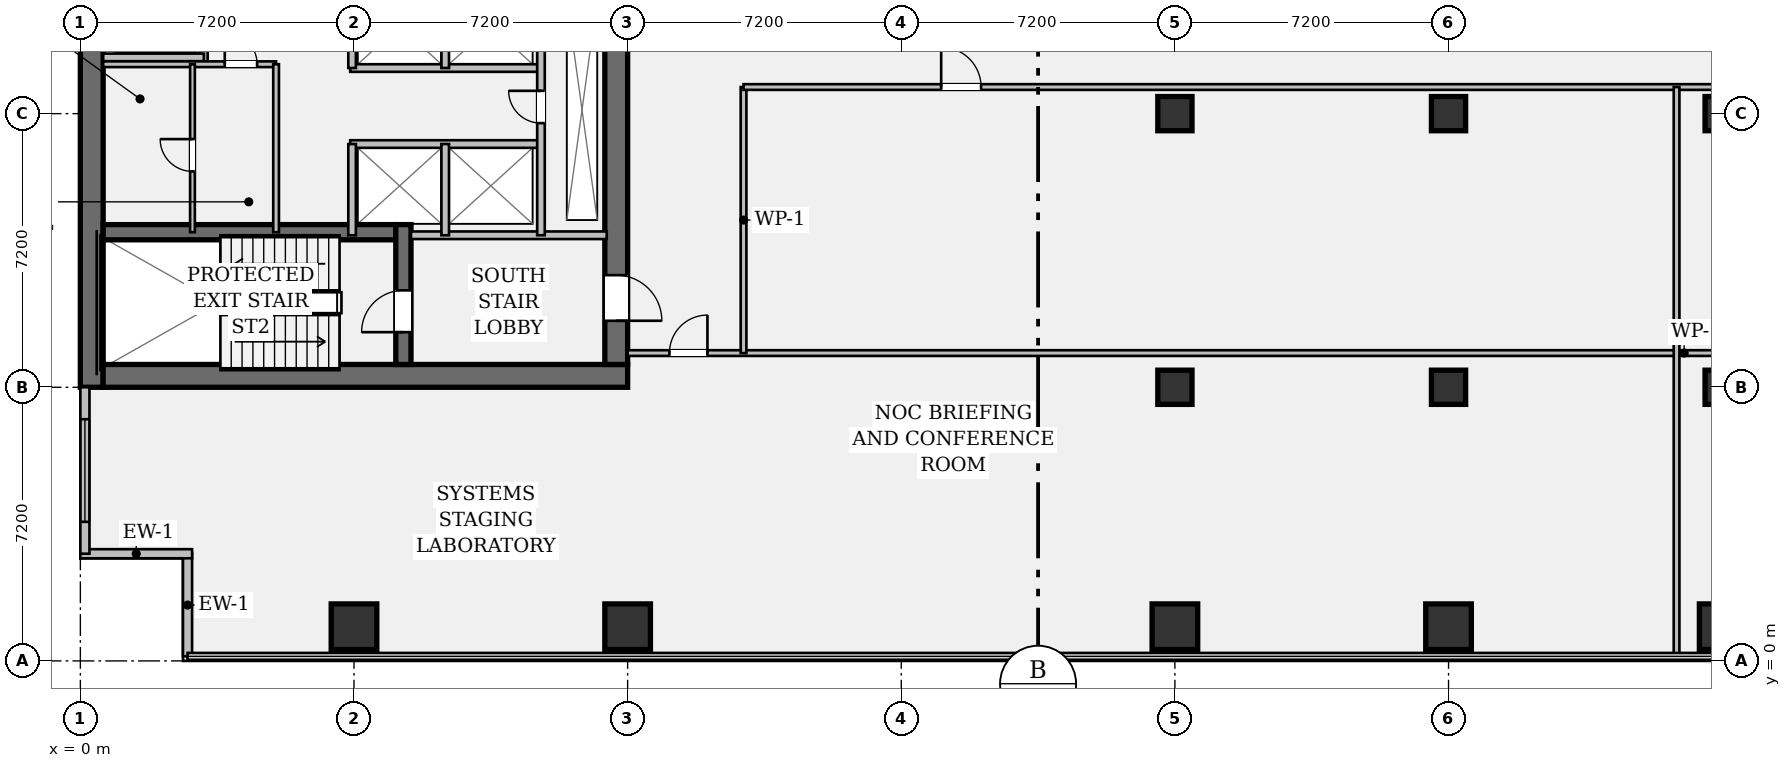
"""IFC4 building model, lengths in metres.
Left out: names, types, materials, properties, quantities, classifications, styles, units other than length and angle.
Written with IfcOpenShell. Run it as: python <this file> out.ifc"""

import sys

from ifc_helpers import new_model, si_unit, direction, frame, frame_2d, origin, origin_2d, place, context, subcontext, project, spatial, rectangle, hollow_rectangle, extrude, element, fill, save


model = new_model("IFC4")
c1 = context("Model", 3, precision=1e-05, world=origin(), true_north=direction((0.0, 1.0)))
c2 = subcontext(c1, "Body", "Model", "MODEL_VIEW")
j1 = project(units=[si_unit("LENGTHUNIT", "METRE"), si_unit("PLANEANGLEUNIT", "RADIAN")], contexts=[c1])
p1 = place(None, origin())
s1 = spatial("IfcSite", under=j1, at=p1, CompositionType="ELEMENT")
p2 = place(p1, origin())
s2 = spatial("IfcBuilding", under=s1, at=p2, CompositionType="ELEMENT")
p3 = place(p2, frame((0.0, 0.0, 5.25)))
s3 = spatial("IfcBuildingStorey", under=s2, at=p3, CompositionType="ELEMENT", Elevation=5.25)
p4 = place(p3, frame((0.3, 7.2, 0.0), z_axis=(0.0, 0.0, 1.0), x_axis=(0.0, 1.0, 0.0)))
e1 = element("IfcWall", 1, at=p4, inside=s3, PredefinedType="SHEAR", context=c2, shape_type="SweptSolid", body=[
    extrude(rectangle(XDim=28.8, YDim=0.6, at=frame_2d((14.4, 0.0))), origin(), (0.0, 0.0, 1.0), 3.9),
])
p5 = place(p3, frame((0.6, 7.5, 0.0), z_axis=(0.0, 0.0, 1.0), x_axis=(1.0, 0.0, 0.0)))
e2 = element("IfcWall", 2, at=p5, inside=s3, PredefinedType="SHEAR", context=c2, shape_type="SweptSolid", body=[
    extrude(rectangle(XDim=13.8, YDim=0.6, at=frame_2d((6.9, 0.0))), origin(), (0.0, 0.0, 1.0), 3.9),
])
p6 = place(p3, frame((14.1, 35.4, 0.0), z_axis=(0.0, 0.0, 1.0), x_axis=(0.0, -1.0, 0.0)))
e3 = element("IfcWall", 3, at=p6, inside=s3, PredefinedType="SHEAR", context=c2, shape_type="SweptSolid", body=[
    extrude(rectangle(XDim=27.6, YDim=0.6, at=frame_2d((13.8, 0.0))), origin(), (0.0, 0.0, 1.0), 3.9),
])
p7 = place(p6, frame((1.3, 0.0, 0.0)))
e4 = element("IfcOpeningElement", 4, at=p7, cuts=e3, PredefinedType="OPENING", context=c2, shape_type="SweptSolid", body=[
    extrude(rectangle(XDim=1.2, YDim=2.15, at=frame_2d((0.6, 1.075))), frame((0.0, 0.312, 0.0), z_axis=(0.0, -1.0, 0.0), x_axis=(1.0, 0.0, 0.0)), (0.0, 0.0, 1.0), 0.624),
])
p8 = place(p6, frame((25.25, 0.0, 0.0)))
e5 = element("IfcOpeningElement", 5, at=p8, cuts=e3, PredefinedType="OPENING", context=c2, shape_type="SweptSolid", body=[
    extrude(rectangle(XDim=1.2, YDim=2.15, at=frame_2d((0.6, 1.075))), frame((0.0, 0.312, 0.0), z_axis=(0.0, -1.0, 0.0), x_axis=(1.0, 0.0, 0.0)), (0.0, 0.0, 1.0), 0.624),
])
p9 = place(p6, frame((14.6, 0.0, 0.0)))
e6 = element("IfcOpeningElement", 6, at=p9, cuts=e3, PredefinedType="OPENING", context=c2, shape_type="SweptSolid", body=[
    extrude(rectangle(XDim=1.6, YDim=2.2, at=frame_2d((0.8, 1.1))), frame((0.0, 0.312, 0.0), z_axis=(0.0, -1.0, 0.0), x_axis=(1.0, 0.0, 0.0)), (0.0, 0.0, 1.0), 0.624),
])
p10 = place(p3, frame((0.6, 11.28, 0.0), z_axis=(0.0, 0.0, 1.0), x_axis=(1.0, 0.0, 0.0)))
e7 = element("IfcWall", 7, at=p10, inside=s3, PredefinedType="SHEAR", context=c2, shape_type="SweptSolid", body=[
    extrude(rectangle(XDim=7.7, YDim=0.4, at=frame_2d((3.85, 0.0))), origin(), (0.0, 0.0, 1.0), 3.9),
])
p11 = place(p3, frame((8.5, 7.8, 0.0), z_axis=(0.0, 0.0, 1.0), x_axis=(0.0, 1.0, 0.0)))
e8 = element("IfcWall", 8, at=p11, inside=s3, PredefinedType="SHEAR", context=c2, shape_type="SweptSolid", body=[
    extrude(rectangle(XDim=3.68, YDim=0.4, at=frame_2d((1.84, 0.0))), origin(), (0.0, 0.0, 1.0), 3.9),
])
p12 = place(p11, frame((0.85, 0.0, 0.0)))
e9 = element("IfcOpeningElement", 9, at=p12, cuts=e8, PredefinedType="OPENING", context=c2, shape_type="SweptSolid", body=[
    extrude(rectangle(XDim=1.1, YDim=2.15, at=frame_2d((0.55, 1.075))), frame((0.0, 0.212, 0.0), z_axis=(0.0, -1.0, 0.0), x_axis=(1.0, 0.0, 0.0)), (0.0, 0.0, 1.0), 0.424),
])
for number, where, z_axis, x_axis in (
    (10, (7.2, 0.9, 0.0), (0.0, 0.0, 1.0), (1.0, 0.0, 0.0)),
    (11, (14.4, 0.9, 0.0), (0.0, 0.0, 1.0), (1.0, 0.0, 0.0)),
    (12, (28.8, 0.9, 0.0), (0.0, 0.0, 1.0), (1.0, 0.0, 0.0)),
):
    element("IfcColumn", number, at=place(p3, frame(where, z_axis=z_axis, x_axis=x_axis)), inside=s3, PredefinedType="COLUMN", context=c2, shape_type="SweptSolid", body=[
        extrude(hollow_rectangle(XDim=1.2, YDim=1.2, WallThickness=0.075, at=origin_2d()), origin(), (0.0, 0.0, 1.0), 3.9),
    ])
for number, where, z_axis, x_axis in (
    (13, (28.8, 7.2, 0.0), (0.0, 0.0, 1.0), (1.0, 0.0, 0.0)),
    (14, (28.8, 14.4, 0.0), (0.0, 0.0, 1.0), (1.0, 0.0, 0.0)),
):
    element("IfcColumn", number, at=place(p3, frame(where, z_axis=z_axis, x_axis=x_axis)), inside=s3, PredefinedType="COLUMN", context=c2, shape_type="SweptSolid", body=[
        extrude(rectangle(XDim=0.9, YDim=0.9, at=origin_2d()), origin(), (0.0, 0.0, 1.0), 3.9),
    ])
p13 = place(p3, frame((36.0, 0.9, 0.0), z_axis=(0.0, 0.0, 1.0), x_axis=(1.0, 0.0, 0.0)))
e15 = element("IfcColumn", 15, at=p13, inside=s3, PredefinedType="COLUMN", context=c2, shape_type="SweptSolid", body=[
    extrude(hollow_rectangle(XDim=1.2, YDim=1.2, WallThickness=0.075, at=origin_2d()), origin(), (0.0, 0.0, 1.0), 3.9),
])
for number, where, z_axis, x_axis in (
    (16, (36.0, 7.2, 0.0), (0.0, 0.0, 1.0), (1.0, 0.0, 0.0)),
    (17, (36.0, 14.4, 0.0), (0.0, 0.0, 1.0), (1.0, 0.0, 0.0)),
):
    element("IfcColumn", number, at=place(p3, frame(where, z_axis=z_axis, x_axis=x_axis)), inside=s3, PredefinedType="COLUMN", context=c2, shape_type="SweptSolid", body=[
        extrude(rectangle(XDim=0.9, YDim=0.9, at=origin_2d()), origin(), (0.0, 0.0, 1.0), 3.9),
    ])
p14 = place(p3, frame((43.2, 0.9, 0.0), z_axis=(0.0, 0.0, 1.0), x_axis=(1.0, 0.0, 0.0)))
e18 = element("IfcColumn", 18, at=p14, inside=s3, PredefinedType="COLUMN", context=c2, shape_type="SweptSolid", body=[
    extrude(hollow_rectangle(XDim=1.2, YDim=1.2, WallThickness=0.075, at=origin_2d()), origin(), (0.0, 0.0, 1.0), 3.9),
])
for number, where, z_axis, x_axis in (
    (19, (43.2, 7.2, 0.0), (0.0, 0.0, 1.0), (1.0, 0.0, 0.0)),
    (20, (43.2, 14.4, 0.0), (0.0, 0.0, 1.0), (1.0, 0.0, 0.0)),
):
    element("IfcColumn", number, at=place(p3, frame(where, z_axis=z_axis, x_axis=x_axis)), inside=s3, PredefinedType="COLUMN", context=c2, shape_type="SweptSolid", body=[
        extrude(rectangle(XDim=0.9, YDim=0.9, at=origin_2d()), origin(), (0.0, 0.0, 1.0), 3.9),
    ])
p15 = place(p3, frame((2.82, 0.12, 0.0), z_axis=(0.0, 0.0, 1.0), x_axis=(0.0, 1.0, 0.0)))
e21 = element("IfcWall", 21, at=p15, inside=s3, PredefinedType="STANDARD", context=c2, shape_type="SweptSolid", body=[
    extrude(rectangle(XDim=2.7, YDim=0.24, at=frame_2d((1.35, 0.0))), origin(), (0.0, 0.0, 1.0), 3.9),
])
p16 = place(p3, frame((2.94, 2.82, 0.0), z_axis=(0.0, 0.0, 1.0), x_axis=(-1.0, 0.0, 0.0)))
e22 = element("IfcWall", 22, at=p16, inside=s3, PredefinedType="STANDARD", context=c2, shape_type="SweptSolid", body=[
    extrude(rectangle(XDim=2.94, YDim=0.24, at=frame_2d((1.47, 0.0))), origin(), (0.0, 0.0, 1.0), 3.9),
])
p17 = place(p3, frame((0.12, 2.82, 0.0), z_axis=(0.0, 0.0, 1.0), x_axis=(0.0, 1.0, 0.0)))
e23 = element("IfcWall", 23, at=p17, inside=s3, PredefinedType="STANDARD", context=c2, shape_type="SweptSolid", body=[
    extrude(rectangle(XDim=4.38, YDim=0.24, at=frame_2d((2.19, 0.0))), origin(), (0.0, 0.0, 1.0), 3.9),
])
p18 = place(p17, frame((0.84, 0.0, 0.95)))
e24 = element("IfcOpeningElement", 24, at=p18, cuts=e23, PredefinedType="OPENING", context=c2, shape_type="SweptSolid", body=[
    extrude(rectangle(XDim=2.7, YDim=1.65, at=frame_2d((1.35, 0.825))), frame((0.0, 0.132, 0.0), z_axis=(0.0, -1.0, 0.0), x_axis=(1.0, 0.0, 0.0)), (0.0, 0.0, 1.0), 0.264),
])
p19 = place(p3, frame((8.7, 11.2, 0.0), z_axis=(0.0, 0.0, 1.0), x_axis=(1.0, 0.0, 0.0)))
e25 = element("IfcWall", 25, at=p19, inside=s3, PredefinedType="PARTITIONING", context=c2, shape_type="SweptSolid", body=[
    extrude(rectangle(XDim=5.15, YDim=0.2, at=frame_2d((2.575, 0.0))), origin(), (0.0, 0.0, 1.0), 3.9),
])
p20 = place(p3, frame((3.25, 15.7, 0.0), z_axis=(0.0, 0.0, 1.0), x_axis=(0.0, 1.0, 0.0)))
e26 = element("IfcWall", 26, at=p20, inside=s3, PredefinedType="PARTITIONING", context=c2, shape_type="SweptSolid", body=[
    extrude(rectangle(XDim=13.08, YDim=0.2, at=frame_2d((6.54, 0.0))), origin(), (0.0, 0.0, 1.0), 3.9),
])
p21 = place(p3, frame((0.6, 15.88, 0.0), z_axis=(0.0, 0.0, 1.0), x_axis=(1.0, 0.0, 0.0)))
e27 = element("IfcWall", 27, at=p21, inside=s3, PredefinedType="PARTITIONING", context=c2, shape_type="SweptSolid", body=[
    extrude(rectangle(XDim=2.65, YDim=0.2, at=frame_2d((1.325, 0.0))), origin(), (0.0, 0.0, 1.0), 3.9),
])
for number, where, z_axis, x_axis in (
    (28, (7.1, 15.6, 0.0), (0.0, 0.0, 1.0), (1.0, 0.0, 0.0)),
    (29, (7.1, 13.6, 0.0), (0.0, 0.0, 1.0), (1.0, 0.0, 0.0)),
):
    element("IfcWall", number, at=place(p3, frame(where, z_axis=z_axis, x_axis=x_axis)), inside=s3, PredefinedType="PARTITIONING", context=c2, shape_type="SweptSolid", body=[
        extrude(rectangle(XDim=5.02, YDim=0.2, at=frame_2d((2.51, 0.0))), origin(), (0.0, 0.0, 1.0), 3.9),
    ])
p22 = place(p3, frame((7.15, 15.6, 0.0), z_axis=(0.0, 0.0, 1.0), x_axis=(0.0, 1.0, 0.0)))
e30 = element("IfcWall", 30, at=p22, inside=s3, PredefinedType="PARTITIONING", context=c2, shape_type="SweptSolid", body=[
    extrude(rectangle(XDim=2.2, YDim=0.2, at=frame_2d((1.1, 0.0))), origin(), (0.0, 0.0, 1.0), 3.9),
])
p23 = place(p3, frame((7.15, 11.2, 0.0), z_axis=(0.0, 0.0, 1.0), x_axis=(0.0, 1.0, 0.0)))
e31 = element("IfcWall", 31, at=p23, inside=s3, PredefinedType="PARTITIONING", context=c2, shape_type="SweptSolid", body=[
    extrude(rectangle(XDim=2.4, YDim=0.2, at=frame_2d((1.2, 0.0))), origin(), (0.0, 0.0, 1.0), 3.9),
])
p24 = place(p3, frame((9.6, 15.6, 0.0), z_axis=(0.0, 0.0, 1.0), x_axis=(0.0, 1.0, 0.0)))
e32 = element("IfcWall", 32, at=p24, inside=s3, PredefinedType="PARTITIONING", context=c2, shape_type="SweptSolid", body=[
    extrude(rectangle(XDim=2.2, YDim=0.2, at=frame_2d((1.1, 0.0))), origin(), (0.0, 0.0, 1.0), 3.9),
])
p25 = place(p3, frame((9.6, 11.2, 0.0), z_axis=(0.0, 0.0, 1.0), x_axis=(0.0, 1.0, 0.0)))
e33 = element("IfcWall", 33, at=p25, inside=s3, PredefinedType="PARTITIONING", context=c2, shape_type="SweptSolid", body=[
    extrude(rectangle(XDim=2.4, YDim=0.2, at=frame_2d((1.2, 0.0))), origin(), (0.0, 0.0, 1.0), 3.9),
])
p26 = place(p3, frame((12.12, 11.2, 0.0), z_axis=(0.0, 0.0, 1.0), x_axis=(0.0, 1.0, 0.0)))
e34 = element("IfcWall", 34, at=p26, inside=s3, PredefinedType="PARTITIONING", context=c2, shape_type="SweptSolid", body=[
    extrude(rectangle(XDim=6.6, YDim=0.2, at=frame_2d((3.3, 0.0))), origin(), (0.0, 0.0, 1.0), 3.9),
])
p27 = place(p26, frame((2.95, 0.0, 0.0)))
e35 = element("IfcOpeningElement", 35, at=p27, cuts=e34, PredefinedType="OPENING", context=c2, shape_type="SweptSolid", body=[
    extrude(rectangle(XDim=0.85, YDim=2.15, at=frame_2d((0.425, 1.075))), frame((0.0, 0.112, 0.0), z_axis=(0.0, -1.0, 0.0), x_axis=(1.0, 0.0, 0.0)), (0.0, 0.0, 1.0), 0.224),
])
p28 = place(p3, frame((0.6, 15.7, 0.0), z_axis=(0.0, 0.0, 1.0), x_axis=(1.0, 0.0, 0.0)))
e36 = element("IfcWall", 36, at=p28, inside=s3, PredefinedType="PARTITIONING", context=c2, shape_type="SweptSolid", body=[
    extrude(rectangle(XDim=4.55, YDim=0.15, at=frame_2d((2.275, 0.0))), origin(), (0.0, 0.0, 1.0), 3.9),
])
p29 = place(p28, frame((3.2, 0.0, 0.0)))
e37 = element("IfcOpeningElement", 37, at=p29, cuts=e36, PredefinedType="OPENING", context=c2, shape_type="SweptSolid", body=[
    extrude(rectangle(XDim=0.85, YDim=2.15, at=frame_2d((0.425, 1.075))), frame((0.0, 0.087, 0.0), z_axis=(0.0, -1.0, 0.0), x_axis=(1.0, 0.0, 0.0)), (0.0, 0.0, 1.0), 0.174),
])
p30 = place(p3, frame((5.15, 11.28, 0.0), z_axis=(0.0, 0.0, 1.0), x_axis=(0.0, 1.0, 0.0)))
e38 = element("IfcWall", 38, at=p30, inside=s3, PredefinedType="PARTITIONING", context=c2, shape_type="SweptSolid", body=[
    extrude(rectangle(XDim=4.42, YDim=0.15, at=frame_2d((2.21, 0.0))), origin(), (0.0, 0.0, 1.0), 3.9),
])
p31 = place(p3, frame((2.95, 11.28, 0.0), z_axis=(0.0, 0.0, 1.0), x_axis=(0.0, 1.0, 0.0)))
e39 = element("IfcWall", 39, at=p31, inside=s3, PredefinedType="PARTITIONING", context=c2, shape_type="SweptSolid", body=[
    extrude(rectangle(XDim=4.42, YDim=0.125, at=frame_2d((2.21, 0.0))), origin(), (0.0, 0.0, 1.0), 3.9),
])
p32 = place(p31, frame((1.6, 0.0, 0.0)))
e40 = element("IfcOpeningElement", 40, at=p32, cuts=e39, PredefinedType="OPENING", context=c2, shape_type="SweptSolid", body=[
    extrude(rectangle(XDim=0.85, YDim=2.15, at=frame_2d((0.425, 1.075))), frame((0.0, 0.074, 0.0), z_axis=(0.0, -1.0, 0.0), x_axis=(1.0, 0.0, 0.0)), (0.0, 0.0, 1.0), 0.149),
])
p33 = place(p3, frame((14.4, 8.1, 0.0), z_axis=(0.0, 0.0, 1.0), x_axis=(1.0, 0.0, 0.0)))
e41 = element("IfcWall", 41, at=p33, inside=s3, PredefinedType="PARTITIONING", context=c2, shape_type="SweptSolid", body=[
    extrude(rectangle(XDim=55.6, YDim=0.15, at=frame_2d((27.8, 0.0))), origin(), (0.0, 0.0, 1.0), 2.938),
])
p34 = place(p33, frame((1.1, 0.0, 0.0)))
e42 = element("IfcOpeningElement", 42, at=p34, cuts=e41, PredefinedType="OPENING", context=c2, shape_type="SweptSolid", body=[
    extrude(rectangle(XDim=1.0, YDim=2.15, at=frame_2d((0.5, 1.075))), frame((0.0, 0.087, 0.0), z_axis=(0.0, -1.0, 0.0), x_axis=(1.0, 0.0, 0.0)), (0.0, 0.0, 1.0), 0.174),
])
p35 = place(p3, frame((17.45, 8.1, 0.0), z_axis=(0.0, 0.0, 1.0), x_axis=(0.0, 1.0, 0.0)))
e43 = element("IfcWall", 43, at=p35, inside=s3, PredefinedType="PARTITIONING", context=c2, shape_type="SweptSolid", body=[
    extrude(rectangle(XDim=7.0, YDim=0.15, at=frame_2d((3.5, 0.0))), origin(), (0.0, 0.0, 1.0), 2.938),
])
p36 = place(p3, frame((17.45, 15.1, 0.0), z_axis=(0.0, 0.0, 1.0), x_axis=(1.0, 0.0, 0.0)))
e44 = element("IfcWall", 44, at=p36, inside=s3, PredefinedType="PARTITIONING", context=c2, shape_type="SweptSolid", body=[
    extrude(rectangle(XDim=52.55, YDim=0.15, at=frame_2d((26.275, 0.0))), origin(), (0.0, 0.0, 1.0), 2.938),
])
p37 = place(p36, frame((5.2, 0.0, 0.0)))
e45 = element("IfcOpeningElement", 45, at=p37, cuts=e44, PredefinedType="OPENING", context=c2, shape_type="SweptSolid", body=[
    extrude(rectangle(XDim=1.05, YDim=2.15, at=frame_2d((0.525, 1.075))), frame((0.0, 0.087, 0.0), z_axis=(0.0, -1.0, 0.0), x_axis=(1.0, 0.0, 0.0)), (0.0, 0.0, 1.0), 0.174),
])
p38 = place(p36, frame((27.6, 0.0, 0.0)))
e46 = element("IfcOpeningElement", 46, at=p38, cuts=e44, PredefinedType="OPENING", context=c2, shape_type="SweptSolid", body=[
    extrude(rectangle(XDim=1.05, YDim=2.15, at=frame_2d((0.525, 1.075))), frame((0.0, 0.087, 0.0), z_axis=(0.0, -1.0, 0.0), x_axis=(1.0, 0.0, 0.0)), (0.0, 0.0, 1.0), 0.174),
])
p39 = place(p3, frame((42.0, 0.12, 0.0), z_axis=(0.0, 0.0, 1.0), x_axis=(0.0, 1.0, 0.0)))
e47 = element("IfcWall", 47, at=p39, inside=s3, PredefinedType="PARTITIONING", context=c2, shape_type="SweptSolid", body=[
    extrude(rectangle(XDim=14.98, YDim=0.15, at=frame_2d((7.49, 0.0))), origin(), (0.0, 0.0, 1.0), 2.938),
])
p40 = place(p18, origin())
e48 = element("IfcWindow", 48, at=p40, inside=s3, PartitioningType="SINGLE_PANEL", PredefinedType="WINDOW", context=c2, shape_type="SweptSolid", body=[
    extrude(rectangle(XDim=2.7, YDim=1.65, at=frame_2d((1.35, 0.825))), frame((0.0, 0.03, 0.0), z_axis=(0.0, -1.0, 0.0), x_axis=(1.0, 0.0, 0.0)), (0.0, 0.0, 1.0), 0.06),
])
fill(e24, e48)
p41 = place(p12, origin())
e49 = element("IfcDoor", 49, at=p41, inside=s3, OperationType="SINGLE_SWING_LEFT", PredefinedType="DOOR", context=c2, shape_type="SweptSolid", body=[
    extrude(rectangle(XDim=1.1, YDim=2.15, at=frame_2d((0.55, 1.075))), frame((0.0, 0.025, 0.0), z_axis=(0.0, -1.0, 0.0), x_axis=(1.0, 0.0, 0.0)), (0.0, 0.0, 1.0), 0.05),
])
fill(e9, e49)
p42 = place(p8, origin())
e50 = element("IfcDoor", 50, at=p42, inside=s3, OperationType="SINGLE_SWING_RIGHT", PredefinedType="DOOR", context=c2, shape_type="SweptSolid", body=[
    extrude(rectangle(XDim=1.2, YDim=2.15, at=frame_2d((0.6, 1.075))), frame((0.0, 0.025, 0.0), z_axis=(0.0, -1.0, 0.0), x_axis=(1.0, 0.0, 0.0)), (0.0, 0.0, 1.0), 0.05),
])
fill(e5, e50)
p43 = place(p27, origin())
e51 = element("IfcDoor", 51, at=p43, inside=s3, OperationType="SINGLE_SWING_RIGHT", PredefinedType="DOOR", context=c2, shape_type="SweptSolid", body=[
    extrude(rectangle(XDim=0.85, YDim=2.15, at=frame_2d((0.425, 1.075))), frame((0.0, 0.025, 0.0), z_axis=(0.0, -1.0, 0.0), x_axis=(1.0, 0.0, 0.0)), (0.0, 0.0, 1.0), 0.05),
])
fill(e35, e51)
p44 = place(p29, origin())
e52 = element("IfcDoor", 52, at=p44, inside=s3, OperationType="SINGLE_SWING_LEFT", PredefinedType="DOOR", context=c2, shape_type="SweptSolid", body=[
    extrude(rectangle(XDim=0.85, YDim=2.15, at=frame_2d((0.425, 1.075))), frame((0.0, 0.025, 0.0), z_axis=(0.0, -1.0, 0.0), x_axis=(1.0, 0.0, 0.0)), (0.0, 0.0, 1.0), 0.05),
])
fill(e37, e52)
p45 = place(p32, origin())
e53 = element("IfcDoor", 53, at=p45, inside=s3, OperationType="SINGLE_SWING_RIGHT", PredefinedType="DOOR", context=c2, shape_type="SweptSolid", body=[
    extrude(rectangle(XDim=0.85, YDim=2.15, at=frame_2d((0.425, 1.075))), frame((0.0, 0.025, 0.0), z_axis=(0.0, -1.0, 0.0), x_axis=(1.0, 0.0, 0.0)), (0.0, 0.0, 1.0), 0.05),
])
fill(e40, e53)
p46 = place(p34, origin())
e54 = element("IfcDoor", 54, at=p46, inside=s3, OperationType="SINGLE_SWING_RIGHT", PredefinedType="DOOR", context=c2, shape_type="SweptSolid", body=[
    extrude(rectangle(XDim=1.0, YDim=2.15, at=frame_2d((0.5, 1.075))), frame((0.0, 0.025, 0.0), z_axis=(0.0, -1.0, 0.0), x_axis=(1.0, 0.0, 0.0)), (0.0, 0.0, 1.0), 0.05),
])
fill(e42, e54)
p47 = place(p37, origin())
e55 = element("IfcDoor", 55, at=p47, inside=s3, OperationType="SINGLE_SWING_LEFT", PredefinedType="DOOR", context=c2, shape_type="SweptSolid", body=[
    extrude(rectangle(XDim=1.05, YDim=2.15, at=frame_2d((0.525, 1.075))), frame((0.0, 0.025, 0.0), z_axis=(0.0, -1.0, 0.0), x_axis=(1.0, 0.0, 0.0)), (0.0, 0.0, 1.0), 0.05),
])
fill(e45, e55)
save(model, sys.argv[1])
